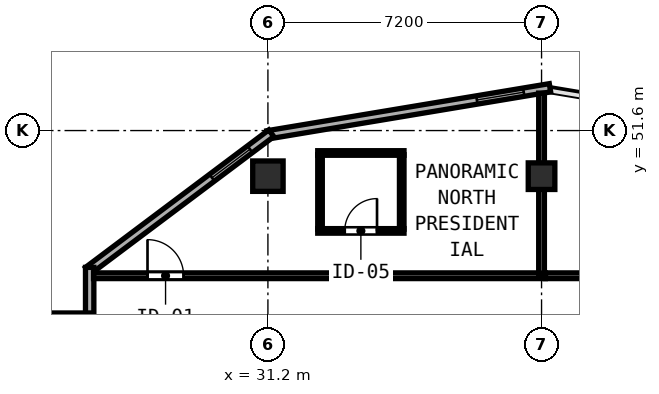
"""IFC4 building model, lengths in metres.
Left out: names, types, materials, properties, quantities, classifications, styles, units other than length and angle.
Written with IfcOpenShell. Run it as: python <this file> out.ifc"""

import sys

from ifc_helpers import new_model, si_unit, direction, frame, frame_2d, origin, origin_2d, place, context, subcontext, project, spatial, rectangle, hollow_rectangle, extrude, element, fill, save


model = new_model("IFC4")
c1 = context("Model", 3, precision=1e-05, world=origin(), true_north=direction((0.0, 1.0)))
c2 = subcontext(c1, "Body", "Model", "MODEL_VIEW")
j1 = project(units=[si_unit("LENGTHUNIT", "METRE"), si_unit("PLANEANGLEUNIT", "RADIAN")], contexts=[c1])
p1 = place(None, origin())
s1 = spatial("IfcSite", under=j1, at=p1, CompositionType="ELEMENT")
p2 = place(p1, origin())
s2 = spatial("IfcBuilding", under=s1, at=p2, CompositionType="ELEMENT")
p3 = place(p2, frame((0.0, 0.0, 246.75)))
s3 = spatial("IfcBuildingStorey", under=s2, at=p3, CompositionType="ELEMENT", Elevation=246.75)
p4 = place(p3, frame((31.2, 50.4, 0.0), z_axis=(0.0, 0.0, 1.0), x_axis=(1.0, 0.0, 0.0)))
e1 = element("IfcColumn", 1, at=p4, inside=s3, PredefinedType="COLUMN", context=c2, shape_type="SweptSolid", body=[
    extrude(hollow_rectangle(XDim=0.8, YDim=0.8, WallThickness=0.03, at=origin_2d()), origin(), (0.0, 0.0, 1.0), 3.85),
])
p5 = place(p3, frame((38.4, 50.4, 0.0), z_axis=(0.0, 0.0, 1.0), x_axis=(1.0, 0.0, 0.0)))
e2 = element("IfcColumn", 2, at=p5, inside=s3, PredefinedType="COLUMN", context=c2, shape_type="SweptSolid", body=[
    extrude(hollow_rectangle(XDim=0.7, YDim=0.7, WallThickness=0.026, at=origin_2d()), origin(), (0.0, 0.0, 1.0), 3.85),
])
p6 = place(p3, frame((38.622, 52.726, 0.0), z_axis=(0.0, 0.0, 1.0), x_axis=(-0.986390420428, -0.164420006349, 0.0)))
e3 = element("IfcWall", 3, at=p6, inside=s3, PredefinedType="SOLIDWALL", context=c2, shape_type="SweptSolid", body=[
    extrude(rectangle(XDim=7.534, YDim=0.22, at=frame_2d((3.767, 0.0))), origin(), (0.0, 0.0, 1.0), 3.67),
])
p7 = place(p6, frame((0.7, 0.0, 0.85)))
e4 = element("IfcOpeningElement", 4, at=p7, cuts=e3, PredefinedType="OPENING", context=c2, shape_type="SweptSolid", body=[
    extrude(rectangle(XDim=1.25, YDim=1.95, at=frame_2d((0.625, 0.975))), frame((0.0, 0.12, 0.0), z_axis=(0.0, -1.0, 0.0), x_axis=(1.0, 0.0, 0.0)), (0.0, 0.0, 1.0), 0.24),
])
p8 = place(p3, frame((31.289, 51.529, 0.0), z_axis=(0.0, 0.0, 1.0), x_axis=(-0.800014580093, -0.599980559383, 0.0)))
e5 = element("IfcWall", 5, at=p8, inside=s3, PredefinedType="SOLIDWALL", context=c2, shape_type="SweptSolid", body=[
    extrude(rectangle(XDim=6.028, YDim=0.22, at=frame_2d((3.014, 0.0))), origin(), (0.0, 0.0, 1.0), 3.67),
])
p9 = place(p8, frame((0.7, 0.0, 0.85)))
e6 = element("IfcOpeningElement", 6, at=p9, cuts=e5, PredefinedType="OPENING", context=c2, shape_type="SweptSolid", body=[
    extrude(rectangle(XDim=1.25, YDim=1.95, at=frame_2d((0.625, 0.975))), frame((0.0, 0.12, 0.0), z_axis=(0.0, -1.0, 0.0), x_axis=(1.0, 0.0, 0.0)), (0.0, 0.0, 1.0), 0.24),
])
p10 = place(p3, frame((26.51, 48.0, 0.0), z_axis=(0.0, 0.0, 1.0), x_axis=(0.0, -1.0, 0.0)))
e7 = element("IfcWall", 7, at=p10, inside=s3, PredefinedType="SOLIDWALL", context=c2, shape_type="SweptSolid", body=[
    extrude(rectangle(XDim=1.365, YDim=0.22, at=frame_2d((0.683, 0.0))), origin(), (0.0, 0.0, 1.0), 3.67),
])
p11 = place(p3, frame((26.565, 46.69, 0.0), z_axis=(0.0, 0.0, 1.0), x_axis=(-1.0, 0.0, 0.0)))
e8 = element("IfcWall", 8, at=p11, inside=s3, PredefinedType="SOLIDWALL", context=c2, shape_type="SweptSolid", body=[
    extrude(rectangle(XDim=1.31, YDim=0.22, at=frame_2d((0.655, 0.0))), origin(), (0.0, 0.0, 1.0), 3.67),
])
p12 = place(p3, frame((26.612, 47.78, 0.0), z_axis=(0.0, 0.0, 1.0), x_axis=(1.0, 0.0, 0.0)))
e9 = element("IfcWall", 9, at=p12, inside=s3, PredefinedType="PARTITIONING", context=c2, shape_type="SweptSolid", body=[
    extrude(rectangle(XDim=11.888, YDim=0.15, at=frame_2d((5.944, 0.0))), origin(), (0.0, 0.0, 1.0), 3.67),
])
p13 = place(p12, frame((1.42, 0.0, 0.0)))
e10 = element("IfcOpeningElement", 10, at=p13, cuts=e9, PredefinedType="OPENING", context=c2, shape_type="SweptSolid", body=[
    extrude(rectangle(XDim=0.95, YDim=2.18, at=frame_2d((0.475, 1.09))), frame((0.0, 0.085, 0.0), z_axis=(0.0, -1.0, 0.0), x_axis=(1.0, 0.0, 0.0)), (0.0, 0.0, 1.0), 0.17),
])
p14 = place(p3, frame((38.4, 47.84, 0.0), z_axis=(0.0, 0.0, 1.0), x_axis=(0.0, 1.0, 0.0)))
e11 = element("IfcWall", 11, at=p14, inside=s3, PredefinedType="PARTITIONING", context=c2, shape_type="SweptSolid", body=[
    extrude(rectangle(XDim=4.745, YDim=0.15, at=frame_2d((2.373, 0.0))), origin(), (0.0, 0.0, 1.0), 3.67),
])
p15 = place(p3, frame((32.511, 51.01, 0.0), z_axis=(0.0, 0.0, 1.0), x_axis=(1.0, 0.0, 0.0)))
e12 = element("IfcWall", 12, at=p15, inside=s3, PredefinedType="PARTITIONING", context=c2, shape_type="SweptSolid", body=[
    extrude(rectangle(XDim=2.27, YDim=0.12, at=frame_2d((1.135, 0.0))), origin(), (0.0, 0.0, 1.0), 3.67),
])
p16 = place(p3, frame((32.511, 48.96, 0.0), z_axis=(0.0, 0.0, 1.0), x_axis=(1.0, 0.0, 0.0)))
e13 = element("IfcWall", 13, at=p16, inside=s3, PredefinedType="PARTITIONING", context=c2, shape_type="SweptSolid", body=[
    extrude(rectangle(XDim=2.27, YDim=0.12, at=frame_2d((1.135, 0.0))), origin(), (0.0, 0.0, 1.0), 3.67),
])
p17 = place(p16, frame((0.71, 0.0, 0.0)))
e14 = element("IfcOpeningElement", 14, at=p17, cuts=e13, PredefinedType="OPENING", context=c2, shape_type="SweptSolid", body=[
    extrude(rectangle(XDim=0.85, YDim=2.1, at=frame_2d((0.425, 1.05))), frame((0.0, 0.07, 0.0), z_axis=(0.0, -1.0, 0.0), x_axis=(1.0, 0.0, 0.0)), (0.0, 0.0, 1.0), 0.14),
])
for number, where, z_axis, x_axis in (
    (15, (32.571, 49.005, 0.0), (0.0, 0.0, 1.0), (0.0, 1.0, 0.0)),
    (16, (34.721, 49.005, 0.0), (0.0, 0.0, 1.0), (0.0, 1.0, 0.0)),
):
    element("IfcWall", number, at=place(p3, frame(where, z_axis=z_axis, x_axis=x_axis)), inside=s3, PredefinedType="PARTITIONING", context=c2, shape_type="SweptSolid", body=[
        extrude(rectangle(XDim=1.96, YDim=0.12, at=frame_2d((0.98, 0.0))), origin(), (0.0, 0.0, 1.0), 3.67),
    ])
p18 = place(p3, frame((38.502, 47.78, 0.0), z_axis=(0.0, 0.0, 1.0), x_axis=(1.0, 0.0, 0.0)))
e17 = element("IfcWall", 17, at=p18, inside=s3, PredefinedType="PARTITIONING", context=c2, shape_type="SweptSolid", body=[
    extrude(rectangle(XDim=11.686, YDim=0.15, at=frame_2d((5.843, 0.0))), origin(), (0.0, 0.0, 1.0), 3.67),
])
p19 = place(p18, frame((4.648, 0.0, 0.0)))
e18 = element("IfcOpeningElement", 18, at=p19, cuts=e17, PredefinedType="OPENING", context=c2, shape_type="SweptSolid", body=[
    extrude(rectangle(XDim=0.95, YDim=2.12, at=frame_2d((0.475, 1.06))), frame((0.0, 0.085, 0.0), z_axis=(0.0, -1.0, 0.0), x_axis=(1.0, 0.0, 0.0)), (0.0, 0.0, 1.0), 0.17),
])
p20 = place(p7, origin())
e19 = element("IfcWindow", 19, at=p20, inside=s3, PartitioningType="SINGLE_PANEL", PredefinedType="WINDOW", context=c2, shape_type="SweptSolid", body=[
    extrude(rectangle(XDim=1.25, YDim=1.95, at=frame_2d((0.625, 0.975))), frame((0.0, 0.03, 0.0), z_axis=(0.0, -1.0, 0.0), x_axis=(1.0, 0.0, 0.0)), (0.0, 0.0, 1.0), 0.06),
])
fill(e4, e19)
p21 = place(p9, origin())
e20 = element("IfcWindow", 20, at=p21, inside=s3, PartitioningType="SINGLE_PANEL", PredefinedType="WINDOW", context=c2, shape_type="SweptSolid", body=[
    extrude(rectangle(XDim=1.25, YDim=1.95, at=frame_2d((0.625, 0.975))), frame((0.0, 0.03, 0.0), z_axis=(0.0, -1.0, 0.0), x_axis=(1.0, 0.0, 0.0)), (0.0, 0.0, 1.0), 0.06),
])
fill(e6, e20)
p22 = place(p13, origin())
e21 = element("IfcDoor", 21, at=p22, inside=s3, OperationType="SINGLE_SWING_LEFT", PredefinedType="DOOR", context=c2, shape_type="SweptSolid", body=[
    extrude(rectangle(XDim=0.95, YDim=2.18, at=frame_2d((0.475, 1.09))), frame((0.0, 0.025, 0.0), z_axis=(0.0, -1.0, 0.0), x_axis=(1.0, 0.0, 0.0)), (0.0, 0.0, 1.0), 0.05),
])
fill(e10, e21)
p23 = place(p17, origin())
e22 = element("IfcDoor", 22, at=p23, inside=s3, OperationType="SINGLE_SWING_RIGHT", PredefinedType="DOOR", context=c2, shape_type="SweptSolid", body=[
    extrude(rectangle(XDim=0.85, YDim=2.1, at=frame_2d((0.425, 1.05))), frame((0.0, 0.025, 0.0), z_axis=(0.0, -1.0, 0.0), x_axis=(1.0, 0.0, 0.0)), (0.0, 0.0, 1.0), 0.05),
])
fill(e14, e22)
save(model, sys.argv[1])
